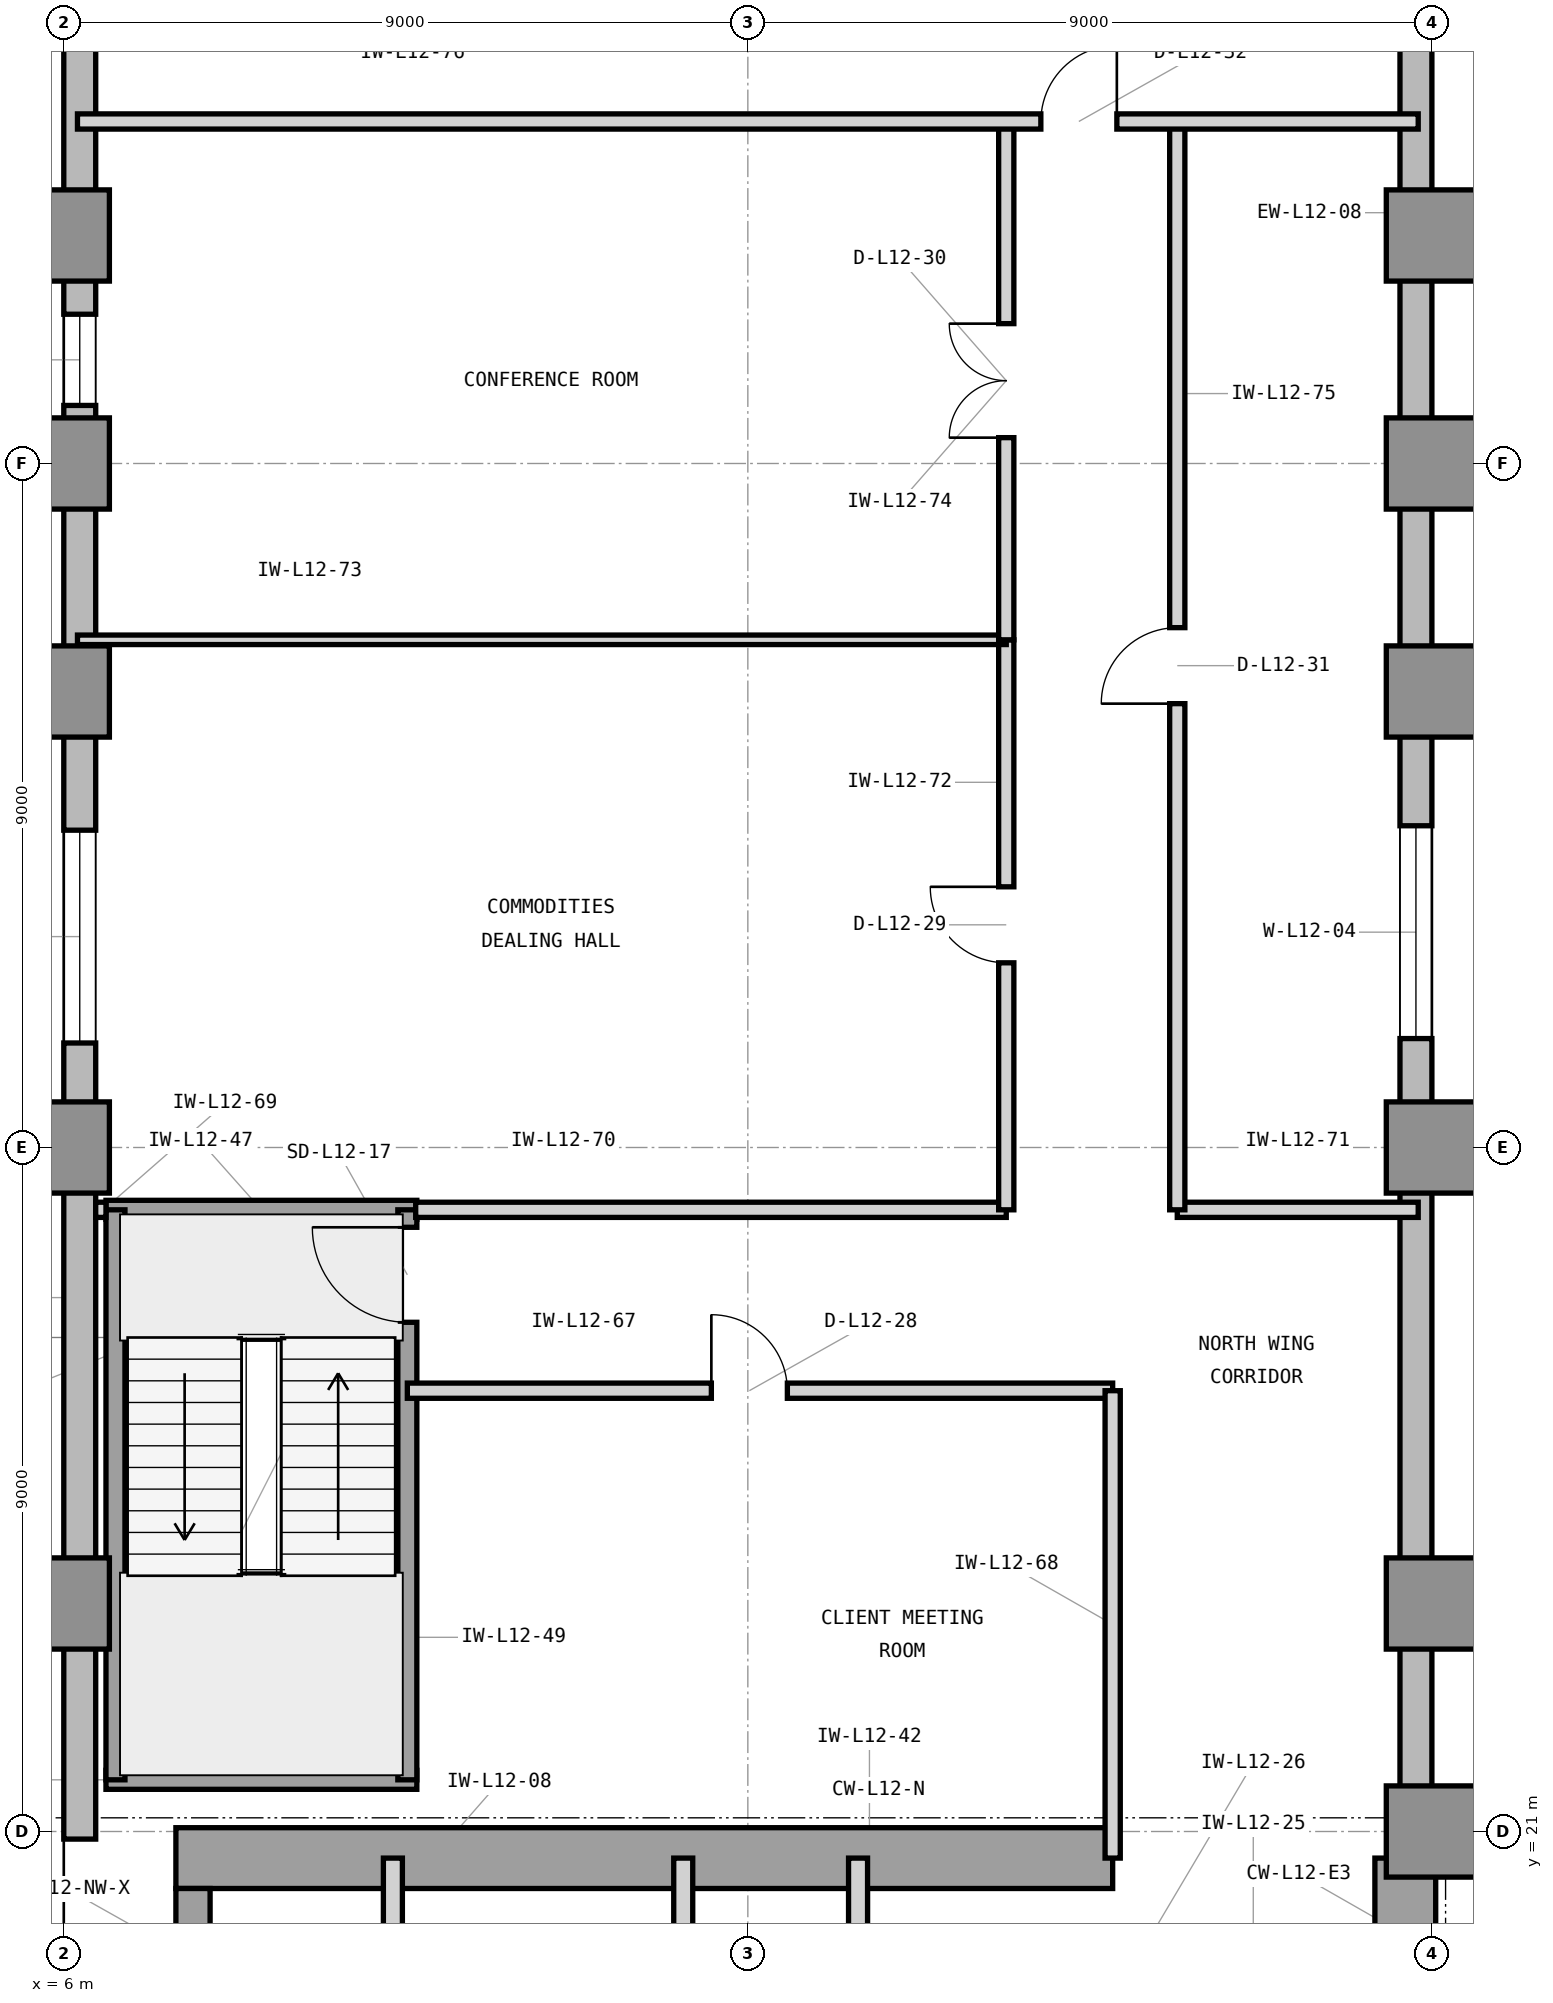
"""IFC4 building model, lengths in metres.
Left out: names, types, materials, properties, quantities, classifications, styles, units other than length and angle.
Written with IfcOpenShell. Run it as: python <this file> out.ifc"""

import sys

from ifc_helpers import new_model, si_unit, direction, frame, frame_2d, origin, origin_2d, place, context, subcontext, project, spatial, rectangle, extrude, element, fill, save


model = new_model("IFC4")
c1 = context("Model", 3, precision=1e-05, world=origin(), true_north=direction((0.0, 1.0)))
c2 = subcontext(c1, "Body", "Model", "MODEL_VIEW")
j1 = project(units=[si_unit("LENGTHUNIT", "METRE"), si_unit("PLANEANGLEUNIT", "RADIAN")], contexts=[c1])
p1 = place(None, origin())
s1 = spatial("IfcSite", under=j1, at=p1, CompositionType="ELEMENT")
p2 = place(p1, origin())
s2 = spatial("IfcBuilding", under=s1, at=p2, CompositionType="ELEMENT")
p3 = place(p2, frame((0.0, 0.0, 55.2)))
s3 = spatial("IfcBuildingStorey", under=s2, at=p3, CompositionType="ELEMENT", Elevation=55.2)
p4 = place(p3, frame((7.475, 20.65, 0.0), z_axis=(0.0, 0.0, 1.0), x_axis=(1.0, 0.0, 0.0)))
e1 = element("IfcWall", 1, at=p4, inside=s3, PredefinedType="SHEAR", context=c2, shape_type="SweptSolid", body=[
    extrude(rectangle(XDim=12.325, YDim=0.8, at=frame_2d((6.163, 0.0))), origin(), (0.0, 0.0, 1.0), 4.2),
])
p5 = place(p3, frame((23.65, 16.6, 0.0), z_axis=(0.0, 0.0, 1.0), x_axis=(0.0, 1.0, 0.0)))
e2 = element("IfcWall", 2, at=p5, inside=s3, PredefinedType="SHEAR", context=c2, shape_type="SweptSolid", body=[
    extrude(rectangle(XDim=4.05, YDim=0.8, at=frame_2d((2.025, 0.0))), origin(), (0.0, 0.0, 1.0), 4.2),
])
p6 = place(p3, frame((7.7, 19.575, 0.0), z_axis=(0.0, 0.0, 1.0), x_axis=(0.0, 1.0, 0.0)))
e3 = element("IfcWall", 3, at=p6, inside=s3, PredefinedType="SHEAR", context=c2, shape_type="SweptSolid", body=[
    extrude(rectangle(XDim=0.675, YDim=0.45, at=frame_2d((0.337, 0.0))), origin(), (0.0, 0.0, 1.0), 4.2),
])
for number, where, z_axis, x_axis in (
    (4, (24.0, 21.0, 0.0), (0.0, 0.0, 1.0), (1.0, 0.0, 0.0)),
    (5, (6.0, 24.0, 0.0), (0.0, 0.0, 1.0), (1.0, 0.0, 0.0)),
    (6, (24.0, 24.0, 0.0), (0.0, 0.0, 1.0), (1.0, 0.0, 0.0)),
    (7, (6.0, 30.0, 0.0), (0.0, 0.0, 1.0), (1.0, 0.0, 0.0)),
    (8, (24.0, 30.0, 0.0), (0.0, 0.0, 1.0), (1.0, 0.0, 0.0)),
    (9, (6.0, 36.0, 0.0), (0.0, 0.0, 1.0), (1.0, 0.0, 0.0)),
    (10, (24.0, 36.0, 0.0), (0.0, 0.0, 1.0), (1.0, 0.0, 0.0)),
    (11, (6.0, 39.0, 0.0), (0.0, 0.0, 1.0), (1.0, 0.0, 0.0)),
    (12, (24.0, 39.0, 0.0), (0.0, 0.0, 1.0), (1.0, 0.0, 0.0)),
    (13, (6.0, 42.0, 0.0), (0.0, 0.0, 1.0), (1.0, 0.0, 0.0)),
    (14, (24.0, 42.0, 0.0), (0.0, 0.0, 1.0), (1.0, 0.0, 0.0)),
):
    element("IfcColumn", number, at=place(p3, frame(where, z_axis=z_axis, x_axis=x_axis)), inside=s3, PredefinedType="COLUMN", context=c2, shape_type="SweptSolid", body=[
        extrude(rectangle(XDim=1.2, YDim=1.2, at=origin_2d()), origin(), (0.0, 0.0, 1.0), 4.2),
    ])
p7 = place(p3, frame((64.4, 20.79, 0.0), z_axis=(0.0, 0.0, 1.0), x_axis=(-1.0, 0.0, 0.0)))
e15 = element("IfcWall", 15, at=p7, inside=s3, PredefinedType="STANDARD", context=c2, shape_type="SweptSolid", body=[
    extrude(rectangle(XDim=40.4, YDim=0.42, at=frame_2d((20.2, 0.0))), origin(), (0.0, 0.0, 1.0), 3.98),
])
p8 = place(p7, frame((26.375, 0.0, 0.85)))
e16 = element("IfcOpeningElement", 16, at=p8, cuts=e15, PredefinedType="OPENING", context=c2, shape_type="SweptSolid", body=[
    extrude(rectangle(XDim=2.8, YDim=2.45, at=frame_2d((1.4, 1.225))), frame((0.0, 0.22, 0.0), z_axis=(0.0, -1.0, 0.0), x_axis=(1.0, 0.0, 0.0)), (0.0, 0.0, 1.0), 0.44),
])
p9 = place(p7, frame((38.222, 0.0, 0.85)))
e17 = element("IfcOpeningElement", 17, at=p9, cuts=e15, PredefinedType="OPENING", context=c2, shape_type="SweptSolid", body=[
    extrude(rectangle(XDim=1.2, YDim=2.45, at=frame_2d((0.6, 1.225))), frame((0.0, 0.22, 0.0), z_axis=(0.0, -1.0, 0.0), x_axis=(1.0, 0.0, 0.0)), (0.0, 0.0, 1.0), 0.44),
])
p10 = place(p7, frame((33.286, 0.0, 0.85)))
e18 = element("IfcOpeningElement", 18, at=p10, cuts=e15, PredefinedType="OPENING", context=c2, shape_type="SweptSolid", body=[
    extrude(rectangle(XDim=2.8, YDim=2.45, at=frame_2d((1.4, 1.225))), frame((0.0, 0.22, 0.0), z_axis=(0.0, -1.0, 0.0), x_axis=(1.0, 0.0, 0.0)), (0.0, 0.0, 1.0), 0.44),
])
p11 = place(p7, frame((18.636, 0.0, 0.85)))
e19 = element("IfcOpeningElement", 19, at=p11, cuts=e15, PredefinedType="OPENING", context=c2, shape_type="SweptSolid", body=[
    extrude(rectangle(XDim=2.8, YDim=2.45, at=frame_2d((1.4, 1.225))), frame((0.0, 0.22, 0.0), z_axis=(0.0, -1.0, 0.0), x_axis=(1.0, 0.0, 0.0)), (0.0, 0.0, 1.0), 0.44),
])
p12 = place(p7, frame((11.436, 0.0, 0.85)))
e20 = element("IfcOpeningElement", 20, at=p12, cuts=e15, PredefinedType="OPENING", context=c2, shape_type="SweptSolid", body=[
    extrude(rectangle(XDim=1.2, YDim=2.45, at=frame_2d((0.6, 1.225))), frame((0.0, 0.22, 0.0), z_axis=(0.0, -1.0, 0.0), x_axis=(1.0, 0.0, 0.0)), (0.0, 0.0, 1.0), 0.44),
])
p13 = place(p3, frame((23.79, 21.0, 0.0), z_axis=(0.0, 0.0, 1.0), x_axis=(0.0, 1.0, 0.0)))
e21 = element("IfcWall", 21, at=p13, inside=s3, PredefinedType="STANDARD", context=c2, shape_type="SweptSolid", body=[
    extrude(rectangle(XDim=28.4, YDim=0.42, at=frame_2d((14.2, 0.0))), origin(), (0.0, 0.0, 1.0), 3.98),
])
p14 = place(p13, frame((10.433, 0.0, 0.85)))
e22 = element("IfcOpeningElement", 22, at=p14, cuts=e21, PredefinedType="OPENING", context=c2, shape_type="SweptSolid", body=[
    extrude(rectangle(XDim=2.8, YDim=2.45, at=frame_2d((1.4, 1.225))), frame((0.0, 0.22, 0.0), z_axis=(0.0, -1.0, 0.0), x_axis=(1.0, 0.0, 0.0)), (0.0, 0.0, 1.0), 0.44),
])
p15 = place(p3, frame((6.21, 49.4, 0.0), z_axis=(0.0, 0.0, 1.0), x_axis=(0.0, -1.0, 0.0)))
e23 = element("IfcWall", 23, at=p15, inside=s3, PredefinedType="STANDARD", context=c2, shape_type="SweptSolid", body=[
    extrude(rectangle(XDim=28.5, YDim=0.42, at=frame_2d((14.25, 0.0))), origin(), (0.0, 0.0, 1.0), 3.98),
])
p16 = place(p15, frame((15.225, 0.0, 0.85)))
e24 = element("IfcOpeningElement", 24, at=p16, cuts=e23, PredefinedType="OPENING", context=c2, shape_type="SweptSolid", body=[
    extrude(rectangle(XDim=2.8, YDim=2.45, at=frame_2d((1.4, 1.225))), frame((0.0, 0.22, 0.0), z_axis=(0.0, -1.0, 0.0), x_axis=(1.0, 0.0, 0.0)), (0.0, 0.0, 1.0), 0.44),
])
p17 = place(p15, frame((8.436, 0.0, 0.85)))
e25 = element("IfcOpeningElement", 25, at=p17, cuts=e23, PredefinedType="OPENING", context=c2, shape_type="SweptSolid", body=[
    extrude(rectangle(XDim=1.2, YDim=2.45, at=frame_2d((0.6, 1.225))), frame((0.0, 0.22, 0.0), z_axis=(0.0, -1.0, 0.0), x_axis=(1.0, 0.0, 0.0)), (0.0, 0.0, 1.0), 0.44),
])
p18 = place(p3, frame((10.33, 19.45, 0.0), z_axis=(0.0, 0.0, 1.0), x_axis=(0.0, 1.0, 0.0)))
e26 = element("IfcWall", 26, at=p18, inside=s3, PredefinedType="PARTITIONING", context=c2, shape_type="SweptSolid", body=[
    extrude(rectangle(XDim=1.2, YDim=0.25, at=frame_2d((0.6, 0.0))), origin(), (0.0, 0.0, 1.0), 3.114),
])
for number, where, z_axis, x_axis in (
    (27, (14.15, 16.7, 0.0), (0.0, 0.0, 1.0), (0.0, 1.0, 0.0)),
    (28, (16.45, 16.7, 0.0), (0.0, 0.0, 1.0), (0.0, 1.0, 0.0)),
):
    element("IfcWall", number, at=place(p3, frame(where, z_axis=z_axis, x_axis=x_axis)), inside=s3, PredefinedType="PARTITIONING", context=c2, shape_type="SweptSolid", body=[
        extrude(rectangle(XDim=3.95, YDim=0.25, at=frame_2d((1.975, 0.0))), origin(), (0.0, 0.0, 1.0), 3.97),
    ])
for number, where, z_axis, x_axis in (
    (29, (6.555, 21.68, 0.0), (0.0, 0.0, 1.0), (1.0, 0.0, 0.0)),
    (30, (6.555, 29.18, 0.0), (0.0, 0.0, 1.0), (1.0, 0.0, 0.0)),
):
    element("IfcWall", number, at=place(p3, frame(where, z_axis=z_axis, x_axis=x_axis)), inside=s3, PredefinedType="SHEAR", context=c2, shape_type="SweptSolid", body=[
        extrude(rectangle(XDim=4.09, YDim=0.25, at=frame_2d((2.045, 0.0))), origin(), (0.0, 0.0, 1.0), 4.2),
    ])
p19 = place(p3, frame((6.68, 21.68, 0.0), z_axis=(0.0, 0.0, 1.0), x_axis=(0.0, 1.0, 0.0)))
e31 = element("IfcWall", 31, at=p19, inside=s3, PredefinedType="SHEAR", context=c2, shape_type="SweptSolid", body=[
    extrude(rectangle(XDim=7.5, YDim=0.25, at=frame_2d((3.75, 0.0))), origin(), (0.0, 0.0, 1.0), 4.2),
])
p20 = place(p3, frame((10.52, 21.68, 0.0), z_axis=(0.0, 0.0, 1.0), x_axis=(0.0, 1.0, 0.0)))
e32 = element("IfcWall", 32, at=p20, inside=s3, PredefinedType="SHEAR", context=c2, shape_type="SweptSolid", body=[
    extrude(rectangle(XDim=7.5, YDim=0.25, at=frame_2d((3.75, 0.0))), origin(), (0.0, 0.0, 1.0), 4.2),
])
p21 = place(p20, frame((6.02, 0.0, 0.0)))
e33 = element("IfcOpeningElement", 33, at=p21, cuts=e32, PredefinedType="OPENING", context=c2, shape_type="SweptSolid", body=[
    extrude(rectangle(XDim=1.25, YDim=2.2, at=frame_2d((0.625, 1.1))), frame((0.0, 0.135, 0.0), z_axis=(0.0, -1.0, 0.0), x_axis=(1.0, 0.0, 0.0)), (0.0, 0.0, 1.0), 0.27),
])
p22 = place(p3, frame((10.52, 26.8, 0.0), z_axis=(0.0, 0.0, 1.0), x_axis=(1.0, 0.0, 0.0)))
e34 = element("IfcWall", 34, at=p22, inside=s3, PredefinedType="PARTITIONING", context=c2, shape_type="SweptSolid", body=[
    extrude(rectangle(XDim=9.28, YDim=0.2, at=frame_2d((4.64, 0.0))), origin(), (0.0, 0.0, 1.0), 3.97),
])
p23 = place(p22, frame((4.0, 0.0, 0.0)))
e35 = element("IfcOpeningElement", 35, at=p23, cuts=e34, PredefinedType="OPENING", context=c2, shape_type="SweptSolid", body=[
    extrude(rectangle(XDim=1.0, YDim=2.15, at=frame_2d((0.5, 1.075))), frame((0.0, 0.11, 0.0), z_axis=(0.0, -1.0, 0.0), x_axis=(1.0, 0.0, 0.0)), (0.0, 0.0, 1.0), 0.22),
])
p24 = place(p3, frame((19.8, 20.65, 0.0), z_axis=(0.0, 0.0, 1.0), x_axis=(0.0, 1.0, 0.0)))
e36 = element("IfcWall", 36, at=p24, inside=s3, PredefinedType="PARTITIONING", context=c2, shape_type="SweptSolid", body=[
    extrude(rectangle(XDim=6.15, YDim=0.2, at=frame_2d((3.075, 0.0))), origin(), (0.0, 0.0, 1.0), 3.97),
])
p25 = place(p3, frame((6.42, 29.18, 0.0), z_axis=(0.0, 0.0, 1.0), x_axis=(1.0, 0.0, 0.0)))
e37 = element("IfcWall", 37, at=p25, inside=s3, PredefinedType="PARTITIONING", context=c2, shape_type="SweptSolid", body=[
    extrude(rectangle(XDim=0.135, YDim=0.2, at=frame_2d((0.067, 0.0))), origin(), (0.0, 0.0, 1.0), 3.97),
])
p26 = place(p3, frame((10.63, 29.18, 0.0), z_axis=(0.0, 0.0, 1.0), x_axis=(1.0, 0.0, 0.0)))
e38 = element("IfcWall", 38, at=p26, inside=s3, PredefinedType="PARTITIONING", context=c2, shape_type="SweptSolid", body=[
    extrude(rectangle(XDim=7.77, YDim=0.2, at=frame_2d((3.885, 0.0))), origin(), (0.0, 0.0, 1.0), 3.97),
])
p27 = place(p3, frame((20.65, 29.18, 0.0), z_axis=(0.0, 0.0, 1.0), x_axis=(1.0, 0.0, 0.0)))
e39 = element("IfcWall", 39, at=p27, inside=s3, PredefinedType="PARTITIONING", context=c2, shape_type="SweptSolid", body=[
    extrude(rectangle(XDim=3.17, YDim=0.2, at=frame_2d((1.585, 0.0))), origin(), (0.0, 0.0, 1.0), 3.97),
])
p28 = place(p3, frame((18.4, 29.18, 0.0), z_axis=(0.0, 0.0, 1.0), x_axis=(0.0, 1.0, 0.0)))
e40 = element("IfcWall", 40, at=p28, inside=s3, PredefinedType="PARTITIONING", context=c2, shape_type="SweptSolid", body=[
    extrude(rectangle(XDim=7.5, YDim=0.2, at=frame_2d((3.75, 0.0))), origin(), (0.0, 0.0, 1.0), 3.97),
])
p29 = place(p28, frame((3.25, 0.0, 0.0)))
e41 = element("IfcOpeningElement", 41, at=p29, cuts=e40, PredefinedType="OPENING", context=c2, shape_type="SweptSolid", body=[
    extrude(rectangle(XDim=1.0, YDim=2.15, at=frame_2d((0.5, 1.075))), frame((0.0, 0.11, 0.0), z_axis=(0.0, -1.0, 0.0), x_axis=(1.0, 0.0, 0.0)), (0.0, 0.0, 1.0), 0.22),
])
p30 = place(p3, frame((6.18, 36.68, 0.0), z_axis=(0.0, 0.0, 1.0), x_axis=(1.0, 0.0, 0.0)))
e42 = element("IfcWall", 42, at=p30, inside=s3, PredefinedType="PARTITIONING", context=c2, shape_type="SweptSolid", body=[
    extrude(rectangle(XDim=12.22, YDim=0.125, at=frame_2d((6.11, 0.0))), origin(), (0.0, 0.0, 1.0), 3.97),
])
p31 = place(p3, frame((18.4, 36.68, 0.0), z_axis=(0.0, 0.0, 1.0), x_axis=(0.0, 1.0, 0.0)))
e43 = element("IfcWall", 43, at=p31, inside=s3, PredefinedType="PARTITIONING", context=c2, shape_type="SweptSolid", body=[
    extrude(rectangle(XDim=6.82, YDim=0.2, at=frame_2d((3.41, 0.0))), origin(), (0.0, 0.0, 1.0), 3.97),
])
p32 = place(p31, frame((2.66, 0.0, 0.0)))
e44 = element("IfcOpeningElement", 44, at=p32, cuts=e43, PredefinedType="OPENING", context=c2, shape_type="SweptSolid", body=[
    extrude(rectangle(XDim=1.5, YDim=2.3, at=frame_2d((0.75, 1.15))), frame((0.0, 0.11, 0.0), z_axis=(0.0, -1.0, 0.0), x_axis=(1.0, 0.0, 0.0)), (0.0, 0.0, 1.0), 0.22),
])
p33 = place(p3, frame((20.65, 29.18, 0.0), z_axis=(0.0, 0.0, 1.0), x_axis=(0.0, 1.0, 0.0)))
e45 = element("IfcWall", 45, at=p33, inside=s3, PredefinedType="PARTITIONING", context=c2, shape_type="SweptSolid", body=[
    extrude(rectangle(XDim=14.32, YDim=0.2, at=frame_2d((7.16, 0.0))), origin(), (0.0, 0.0, 1.0), 3.97),
])
p34 = place(p33, frame((6.66, 0.0, 0.0)))
e46 = element("IfcOpeningElement", 46, at=p34, cuts=e45, PredefinedType="OPENING", context=c2, shape_type="SweptSolid", body=[
    extrude(rectangle(XDim=1.0, YDim=2.15, at=frame_2d((0.5, 1.075))), frame((0.0, 0.11, 0.0), z_axis=(0.0, -1.0, 0.0), x_axis=(1.0, 0.0, 0.0)), (0.0, 0.0, 1.0), 0.22),
])
p35 = place(p3, frame((6.18, 43.5, 0.0), z_axis=(0.0, 0.0, 1.0), x_axis=(1.0, 0.0, 0.0)))
e47 = element("IfcWall", 47, at=p35, inside=s3, PredefinedType="PARTITIONING", context=c2, shape_type="SweptSolid", body=[
    extrude(rectangle(XDim=17.64, YDim=0.2, at=frame_2d((8.82, 0.0))), origin(), (0.0, 0.0, 1.0), 3.97),
])
p36 = place(p35, frame((12.675, 0.0, 0.0)))
e48 = element("IfcOpeningElement", 48, at=p36, cuts=e47, PredefinedType="OPENING", context=c2, shape_type="SweptSolid", body=[
    extrude(rectangle(XDim=1.0, YDim=2.15, at=frame_2d((0.5, 1.075))), frame((0.0, 0.11, 0.0), z_axis=(0.0, -1.0, 0.0), x_axis=(1.0, 0.0, 0.0)), (0.0, 0.0, 1.0), 0.22),
])
p37 = place(p14, origin())
e49 = element("IfcWindow", 49, at=p37, inside=s3, PartitioningType="SINGLE_PANEL", PredefinedType="WINDOW", context=c2, shape_type="SweptSolid", body=[
    extrude(rectangle(XDim=2.8, YDim=2.45, at=frame_2d((1.4, 1.225))), frame((0.0, 0.11, 0.0), z_axis=(0.0, -1.0, 0.0), x_axis=(1.0, 0.0, 0.0)), (0.0, 0.0, 1.0), 0.06),
])
fill(e22, e49)
p38 = place(p16, origin())
e50 = element("IfcWindow", 50, at=p38, inside=s3, PartitioningType="SINGLE_PANEL", PredefinedType="WINDOW", context=c2, shape_type="SweptSolid", body=[
    extrude(rectangle(XDim=2.8, YDim=2.45, at=frame_2d((1.4, 1.225))), frame((0.0, 0.11, 0.0), z_axis=(0.0, -1.0, 0.0), x_axis=(1.0, 0.0, 0.0)), (0.0, 0.0, 1.0), 0.06),
])
fill(e24, e50)
p39 = place(p21, origin())
e51 = element("IfcDoor", 51, at=p39, inside=s3, OperationType="SINGLE_SWING_RIGHT", PredefinedType="DOOR", context=c2, shape_type="SweptSolid", body=[
    extrude(rectangle(XDim=1.25, YDim=2.2, at=frame_2d((0.625, 1.1))), frame((0.0, 0.025, 0.0), z_axis=(0.0, -1.0, 0.0), x_axis=(1.0, 0.0, 0.0)), (0.0, 0.0, 1.0), 0.05),
])
fill(e33, e51)
p40 = place(p23, origin())
e52 = element("IfcDoor", 52, at=p40, inside=s3, OperationType="SINGLE_SWING_LEFT", PredefinedType="DOOR", context=c2, shape_type="SweptSolid", body=[
    extrude(rectangle(XDim=1.0, YDim=2.15, at=frame_2d((0.5, 1.075))), frame((0.0, 0.025, 0.0), z_axis=(0.0, -1.0, 0.0), x_axis=(1.0, 0.0, 0.0)), (0.0, 0.0, 1.0), 0.05),
])
fill(e35, e52)
p41 = place(p29, origin())
e53 = element("IfcDoor", 53, at=p41, inside=s3, OperationType="SINGLE_SWING_RIGHT", PredefinedType="DOOR", context=c2, shape_type="SweptSolid", body=[
    extrude(rectangle(XDim=1.0, YDim=2.15, at=frame_2d((0.5, 1.075))), frame((0.0, 0.025, 0.0), z_axis=(0.0, -1.0, 0.0), x_axis=(1.0, 0.0, 0.0)), (0.0, 0.0, 1.0), 0.05),
])
fill(e41, e53)
p42 = place(p32, origin())
e54 = element("IfcDoor", 54, at=p42, inside=s3, OperationType="DOUBLE_DOOR_SINGLE_SWING", PredefinedType="DOOR", context=c2, shape_type="SweptSolid", body=[
    extrude(rectangle(XDim=1.5, YDim=2.3, at=frame_2d((0.75, 1.15))), frame((0.0, 0.025, 0.0), z_axis=(0.0, -1.0, 0.0), x_axis=(1.0, 0.0, 0.0)), (0.0, 0.0, 1.0), 0.05),
])
fill(e44, e54)
p43 = place(p34, origin())
e55 = element("IfcDoor", 55, at=p43, inside=s3, OperationType="SINGLE_SWING_LEFT", PredefinedType="DOOR", context=c2, shape_type="SweptSolid", body=[
    extrude(rectangle(XDim=1.0, YDim=2.15, at=frame_2d((0.5, 1.075))), frame((0.0, 0.025, 0.0), z_axis=(0.0, -1.0, 0.0), x_axis=(1.0, 0.0, 0.0)), (0.0, 0.0, 1.0), 0.05),
])
fill(e46, e55)
p44 = place(p36, origin())
e56 = element("IfcDoor", 56, at=p44, inside=s3, OperationType="SINGLE_SWING_RIGHT", PredefinedType="DOOR", context=c2, shape_type="SweptSolid", body=[
    extrude(rectangle(XDim=1.0, YDim=2.15, at=frame_2d((0.5, 1.075))), frame((0.0, 0.025, 0.0), z_axis=(0.0, -1.0, 0.0), x_axis=(1.0, 0.0, 0.0)), (0.0, 0.0, 1.0), 0.05),
])
fill(e48, e56)
p45 = place(p17, origin())
e57 = element("IfcWindow", 57, at=p45, inside=s3, PartitioningType="SINGLE_PANEL", PredefinedType="WINDOW", context=c2, shape_type="SweptSolid", body=[
    extrude(rectangle(XDim=1.2, YDim=2.45, at=frame_2d((0.6, 1.225))), frame((0.0, 0.11, 0.0), z_axis=(0.0, -1.0, 0.0), x_axis=(1.0, 0.0, 0.0)), (0.0, 0.0, 1.0), 0.06),
])
fill(e25, e57)
save(model, sys.argv[1])
